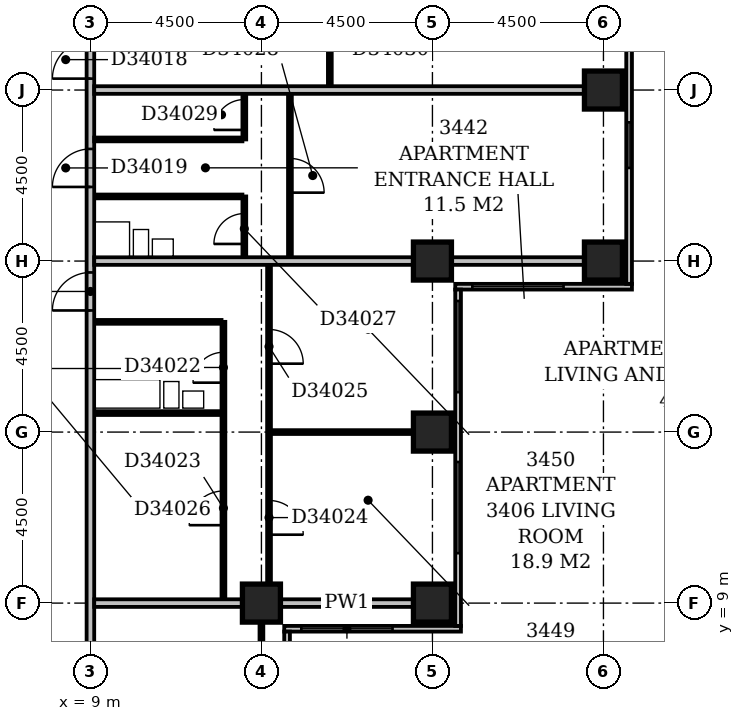
"""IFC4 building model, lengths in metres.
Left out: names, types, materials, properties, quantities, classifications, styles, units other than length and angle.
Written with IfcOpenShell. Run it as: python <this file> out.ifc"""

import sys

from ifc_helpers import new_model, si_unit, direction, frame, frame_2d, origin, origin_2d, place, context, subcontext, project, spatial, rectangle, extrude, element, fill, save


model = new_model("IFC4")
c1 = context("Model", 3, precision=1e-05, world=origin(), true_north=direction((0.0, 1.0)))
c2 = subcontext(c1, "Body", "Model", "MODEL_VIEW")
j1 = project(units=[si_unit("LENGTHUNIT", "METRE"), si_unit("PLANEANGLEUNIT", "RADIAN")], contexts=[c1])
p1 = place(None, origin())
s1 = spatial("IfcSite", under=j1, at=p1, CompositionType="ELEMENT")
p2 = place(p1, origin())
s2 = spatial("IfcBuilding", under=s1, at=p2, CompositionType="ELEMENT")
p3 = place(p2, frame((0.0, 0.0, 137.6)))
s3 = spatial("IfcBuildingStorey", under=s2, at=p3, CompositionType="ELEMENT", Elevation=137.6)
for number, where, z_axis, x_axis in (
    (1, (13.5, 9.0, -0.3), (0.0, 0.0, 1.0), (1.0, 0.0, 0.0)),
    (2, (18.0, 9.0, -0.3), (0.0, 0.0, 1.0), (1.0, 0.0, 0.0)),
    (3, (18.0, 13.5, -0.3), (0.0, 0.0, 1.0), (1.0, 0.0, 0.0)),
    (4, (18.0, 18.0, -0.3), (0.0, 0.0, 1.0), (1.0, 0.0, 0.0)),
    (5, (22.5, 18.0, -0.3), (0.0, 0.0, 1.0), (1.0, 0.0, 0.0)),
    (6, (22.5, 22.5, -0.3), (0.0, 0.0, 1.0), (1.0, 0.0, 0.0)),
):
    element("IfcColumn", number, at=place(p3, frame(where, z_axis=z_axis, x_axis=x_axis)), inside=s3, PredefinedType="COLUMN", context=c2, shape_type="SweptSolid", body=[
        extrude(rectangle(XDim=1.0, YDim=1.0, at=origin_2d()), origin(), (0.0, 0.0, 1.0), 3.6),
    ])
p4 = place(p3, frame((14.175, 3.9, 0.0), z_axis=(0.0, 0.0, 1.0), x_axis=(0.0, 1.0, 0.0)))
e7 = element("IfcWall", 7, at=p4, inside=s3, PredefinedType="STANDARD", context=c2, shape_type="SweptSolid", body=[
    extrude(rectangle(XDim=4.35, YDim=0.15, at=frame_2d((2.175, 0.0))), origin(), (0.0, 0.0, 1.0), 2.7),
])
p5 = place(p4, frame((1.65, 0.0, 0.6)))
e8 = element("IfcOpeningElement", 8, at=p5, cuts=e7, PredefinedType="OPENING", context=c2, shape_type="SweptSolid", body=[
    extrude(rectangle(XDim=2.4, YDim=1.8, at=frame_2d((1.2, 0.9))), frame((0.0, 0.087, 0.0), z_axis=(0.0, -1.0, 0.0), x_axis=(1.0, 0.0, 0.0)), (0.0, 0.0, 1.0), 0.174),
])
p6 = place(p3, frame((14.1, 8.325, 0.0), z_axis=(0.0, 0.0, 1.0), x_axis=(1.0, 0.0, 0.0)))
e9 = element("IfcWall", 9, at=p6, inside=s3, PredefinedType="STANDARD", context=c2, shape_type="SweptSolid", body=[
    extrude(rectangle(XDim=4.65, YDim=0.15, at=frame_2d((2.325, 0.0))), origin(), (0.0, 0.0, 1.0), 2.7),
])
p7 = place(p6, frame((0.45, 0.0, 0.6)))
e10 = element("IfcOpeningElement", 10, at=p7, cuts=e9, PredefinedType="OPENING", context=c2, shape_type="SweptSolid", body=[
    extrude(rectangle(XDim=2.4, YDim=1.8, at=frame_2d((1.2, 0.9))), frame((0.0, 0.087, 0.0), z_axis=(0.0, -1.0, 0.0), x_axis=(1.0, 0.0, 0.0)), (0.0, 0.0, 1.0), 0.174),
])
p8 = place(p3, frame((18.675, 8.4, 0.0), z_axis=(0.0, 0.0, 1.0), x_axis=(0.0, 1.0, 0.0)))
e11 = element("IfcWall", 11, at=p8, inside=s3, PredefinedType="STANDARD", context=c2, shape_type="SweptSolid", body=[
    extrude(rectangle(XDim=8.85, YDim=0.15, at=frame_2d((4.425, 0.0))), origin(), (0.0, 0.0, 1.0), 2.7),
])
p9 = place(p8, frame((1.914, 0.0, 0.6)))
e12 = element("IfcOpeningElement", 12, at=p9, cuts=e11, PredefinedType="OPENING", context=c2, shape_type="SweptSolid", body=[
    extrude(rectangle(XDim=2.4, YDim=1.8, at=frame_2d((1.2, 0.9))), frame((0.0, 0.087, 0.0), z_axis=(0.0, -1.0, 0.0), x_axis=(1.0, 0.0, 0.0)), (0.0, 0.0, 1.0), 0.174),
])
p10 = place(p8, frame((6.15, 0.0, 0.6)))
e13 = element("IfcOpeningElement", 13, at=p10, cuts=e11, PredefinedType="OPENING", context=c2, shape_type="SweptSolid", body=[
    extrude(rectangle(XDim=2.4, YDim=1.8, at=frame_2d((1.2, 0.9))), frame((0.0, 0.087, 0.0), z_axis=(0.0, -1.0, 0.0), x_axis=(1.0, 0.0, 0.0)), (0.0, 0.0, 1.0), 0.174),
])
p11 = place(p3, frame((18.6, 17.325, 0.0), z_axis=(0.0, 0.0, 1.0), x_axis=(1.0, 0.0, 0.0)))
e14 = element("IfcWall", 14, at=p11, inside=s3, PredefinedType="STANDARD", context=c2, shape_type="SweptSolid", body=[
    extrude(rectangle(XDim=4.65, YDim=0.15, at=frame_2d((2.325, 0.0))), origin(), (0.0, 0.0, 1.0), 2.7),
])
p12 = place(p11, frame((0.45, 0.0, 0.6)))
e15 = element("IfcOpeningElement", 15, at=p12, cuts=e14, PredefinedType="OPENING", context=c2, shape_type="SweptSolid", body=[
    extrude(rectangle(XDim=2.4, YDim=1.8, at=frame_2d((1.2, 0.9))), frame((0.0, 0.087, 0.0), z_axis=(0.0, -1.0, 0.0), x_axis=(1.0, 0.0, 0.0)), (0.0, 0.0, 1.0), 0.174),
])
p13 = place(p3, frame((23.175, 17.4, 0.0), z_axis=(0.0, 0.0, 1.0), x_axis=(0.0, 1.0, 0.0)))
e16 = element("IfcWall", 16, at=p13, inside=s3, PredefinedType="STANDARD", context=c2, shape_type="SweptSolid", body=[
    extrude(rectangle(XDim=17.85, YDim=0.15, at=frame_2d((8.925, 0.0))), origin(), (0.0, 0.0, 1.0), 2.7),
])
p14 = place(p13, frame((3.05, 0.0, 0.6)))
e17 = element("IfcOpeningElement", 17, at=p14, cuts=e16, PredefinedType="OPENING", context=c2, shape_type="SweptSolid", body=[
    extrude(rectangle(XDim=1.2, YDim=1.8, at=frame_2d((0.6, 0.9))), frame((0.0, 0.087, 0.0), z_axis=(0.0, -1.0, 0.0), x_axis=(1.0, 0.0, 0.0)), (0.0, 0.0, 1.0), 0.174),
])
p15 = place(p13, frame((6.15, 0.0, 0.6)))
e18 = element("IfcOpeningElement", 18, at=p15, cuts=e16, PredefinedType="OPENING", context=c2, shape_type="SweptSolid", body=[
    extrude(rectangle(XDim=2.4, YDim=1.8, at=frame_2d((1.2, 0.9))), frame((0.0, 0.087, 0.0), z_axis=(0.0, -1.0, 0.0), x_axis=(1.0, 0.0, 0.0)), (0.0, 0.0, 1.0), 0.174),
])
p16 = place(p13, frame((10.65, 0.0, 0.6)))
e19 = element("IfcOpeningElement", 19, at=p16, cuts=e16, PredefinedType="OPENING", context=c2, shape_type="SweptSolid", body=[
    extrude(rectangle(XDim=2.4, YDim=1.8, at=frame_2d((1.2, 0.9))), frame((0.0, 0.087, 0.0), z_axis=(0.0, -1.0, 0.0), x_axis=(1.0, 0.0, 0.0)), (0.0, 0.0, 1.0), 0.174),
])
p17 = place(p13, frame((15.15, 0.0, 0.6)))
e20 = element("IfcOpeningElement", 20, at=p17, cuts=e16, PredefinedType="OPENING", context=c2, shape_type="SweptSolid", body=[
    extrude(rectangle(XDim=2.4, YDim=1.8, at=frame_2d((1.2, 0.9))), frame((0.0, 0.087, 0.0), z_axis=(0.0, -1.0, 0.0), x_axis=(1.0, 0.0, 0.0)), (0.0, 0.0, 1.0), 0.174),
])
p18 = place(p3, frame((9.0, 5.0, 0.0), z_axis=(0.0, 0.0, 1.0), x_axis=(0.0, 1.0, 0.0)))
e21 = element("IfcWall", 21, at=p18, inside=s3, PredefinedType="PARTITIONING", context=c2, shape_type="SweptSolid", body=[
    extrude(rectangle(XDim=27.75, YDim=0.2, at=frame_2d((13.875, 0.0))), origin(), (0.0, 0.0, 1.0), 3.3),
])
p19 = place(p18, frame((17.8, 0.0, 0.0)))
e22 = element("IfcOpeningElement", 22, at=p19, cuts=e21, PredefinedType="OPENING", context=c2, shape_type="SweptSolid", body=[
    extrude(rectangle(XDim=1.0, YDim=2.1, at=frame_2d((0.5, 1.05))), frame((0.0, 0.112, 0.0), z_axis=(0.0, -1.0, 0.0), x_axis=(1.0, 0.0, 0.0)), (0.0, 0.0, 1.0), 0.224),
])
p20 = place(p18, frame((14.95, 0.0, 0.0)))
e23 = element("IfcOpeningElement", 23, at=p20, cuts=e21, PredefinedType="OPENING", context=c2, shape_type="SweptSolid", body=[
    extrude(rectangle(XDim=1.0, YDim=2.1, at=frame_2d((0.5, 1.05))), frame((0.0, 0.112, 0.0), z_axis=(0.0, -1.0, 0.0), x_axis=(1.0, 0.0, 0.0)), (0.0, 0.0, 1.0), 0.224),
])
p21 = place(p18, frame((11.7, 0.0, 0.0)))
e24 = element("IfcOpeningElement", 24, at=p21, cuts=e21, PredefinedType="OPENING", context=c2, shape_type="SweptSolid", body=[
    extrude(rectangle(XDim=1.0, YDim=2.1, at=frame_2d((0.5, 1.05))), frame((0.0, 0.112, 0.0), z_axis=(0.0, -1.0, 0.0), x_axis=(1.0, 0.0, 0.0)), (0.0, 0.0, 1.0), 0.224),
])
p22 = place(p18, frame((1.5, 0.0, 0.0)))
e25 = element("IfcOpeningElement", 25, at=p22, cuts=e21, PredefinedType="OPENING", context=c2, shape_type="SweptSolid", body=[
    extrude(rectangle(XDim=0.9, YDim=2.1, at=frame_2d((0.45, 1.05))), frame((0.0, 0.112, 0.0), z_axis=(0.0, -1.0, 0.0), x_axis=(1.0, 0.0, 0.0)), (0.0, 0.0, 1.0), 0.224),
])
p23 = place(p3, frame((13.5, 5.0, 0.0), z_axis=(0.0, 0.0, 1.0), x_axis=(0.0, 1.0, 0.0)))
e26 = element("IfcWall", 26, at=p23, inside=s3, PredefinedType="PARTITIONING", context=c2, shape_type="SweptSolid", body=[
    extrude(rectangle(XDim=3.5, YDim=0.1, at=frame_2d((1.75, 0.0))), origin(), (0.0, 0.0, 1.0), 2.7),
])
p24 = place(p3, frame((9.1, 9.0, 0.0), z_axis=(0.0, 0.0, 1.0), x_axis=(1.0, 0.0, 0.0)))
e27 = element("IfcWall", 27, at=p24, inside=s3, PredefinedType="PARTITIONING", context=c2, shape_type="SweptSolid", body=[
    extrude(rectangle(XDim=3.9, YDim=0.2, at=frame_2d((1.95, 0.0))), origin(), (0.0, 0.0, 1.0), 3.3),
])
p25 = place(p3, frame((14.0, 9.0, 0.0), z_axis=(0.0, 0.0, 1.0), x_axis=(1.0, 0.0, 0.0)))
e28 = element("IfcWall", 28, at=p25, inside=s3, PredefinedType="PARTITIONING", context=c2, shape_type="SweptSolid", body=[
    extrude(rectangle(XDim=3.5, YDim=0.2, at=frame_2d((1.75, 0.0))), origin(), (0.0, 0.0, 1.0), 2.7),
])
p26 = place(p3, frame((12.5, 9.1, 0.0), z_axis=(0.0, 0.0, 1.0), x_axis=(0.0, 1.0, 0.0)))
e29 = element("IfcWall", 29, at=p26, inside=s3, PredefinedType="PARTITIONING", context=c2, shape_type="SweptSolid", body=[
    extrude(rectangle(XDim=7.3, YDim=0.1, at=frame_2d((3.65, 0.0))), origin(), (0.0, 0.0, 1.0), 3.3),
])
p27 = place(p26, frame((5.7, 0.0, 0.0)))
e30 = element("IfcOpeningElement", 30, at=p27, cuts=e29, PredefinedType="OPENING", context=c2, shape_type="SweptSolid", body=[
    extrude(rectangle(XDim=0.8, YDim=2.1, at=frame_2d((0.4, 1.05))), frame((0.0, 0.062, 0.0), z_axis=(0.0, -1.0, 0.0), x_axis=(1.0, 0.0, 0.0)), (0.0, 0.0, 1.0), 0.124),
])
p28 = place(p26, frame((1.95, 0.0, 0.0)))
e31 = element("IfcOpeningElement", 31, at=p28, cuts=e29, PredefinedType="OPENING", context=c2, shape_type="SweptSolid", body=[
    extrude(rectangle(XDim=0.9, YDim=2.1, at=frame_2d((0.45, 1.05))), frame((0.0, 0.062, 0.0), z_axis=(0.0, -1.0, 0.0), x_axis=(1.0, 0.0, 0.0)), (0.0, 0.0, 1.0), 0.124),
])
p29 = place(p3, frame((13.7, 9.5, 0.0), z_axis=(0.0, 0.0, 1.0), x_axis=(0.0, 1.0, 0.0)))
e32 = element("IfcWall", 32, at=p29, inside=s3, PredefinedType="PARTITIONING", context=c2, shape_type="SweptSolid", body=[
    extrude(rectangle(XDim=8.4, YDim=0.1, at=frame_2d((4.2, 0.0))), origin(), (0.0, 0.0, 1.0), 3.3),
])
p30 = place(p29, frame((1.3, 0.0, 0.0)))
e33 = element("IfcOpeningElement", 33, at=p30, cuts=e32, PredefinedType="OPENING", context=c2, shape_type="SweptSolid", body=[
    extrude(rectangle(XDim=0.9, YDim=2.1, at=frame_2d((0.45, 1.05))), frame((0.0, 0.062, 0.0), z_axis=(0.0, -1.0, 0.0), x_axis=(1.0, 0.0, 0.0)), (0.0, 0.0, 1.0), 0.124),
])
p31 = place(p29, frame((5.8, 0.0, 0.0)))
e34 = element("IfcOpeningElement", 34, at=p31, cuts=e32, PredefinedType="OPENING", context=c2, shape_type="SweptSolid", body=[
    extrude(rectangle(XDim=0.9, YDim=2.1, at=frame_2d((0.45, 1.05))), frame((0.0, 0.062, 0.0), z_axis=(0.0, -1.0, 0.0), x_axis=(1.0, 0.0, 0.0)), (0.0, 0.0, 1.0), 0.124),
])
p32 = place(p3, frame((13.75, 13.5, 0.0), z_axis=(0.0, 0.0, 1.0), x_axis=(1.0, 0.0, 0.0)))
e35 = element("IfcWall", 35, at=p32, inside=s3, PredefinedType="PARTITIONING", context=c2, shape_type="SweptSolid", body=[
    extrude(rectangle(XDim=3.75, YDim=0.1, at=frame_2d((1.875, 0.0))), origin(), (0.0, 0.0, 1.0), 3.3),
])
for number, where, z_axis, x_axis in (
    (36, (9.1, 14.0, 0.0), (0.0, 0.0, 1.0), (1.0, 0.0, 0.0)),
    (37, (9.1, 16.4, 0.0), (0.0, 0.0, 1.0), (1.0, 0.0, 0.0)),
):
    element("IfcWall", number, at=place(p3, frame(where, z_axis=z_axis, x_axis=x_axis)), inside=s3, PredefinedType="PLUMBINGWALL", context=c2, shape_type="SweptSolid", body=[
        extrude(rectangle(XDim=3.35, YDim=0.1, at=frame_2d((1.675, 0.0))), origin(), (0.0, 0.0, 1.0), 3.3),
    ])
p33 = place(p3, frame((9.1, 18.0, 0.0), z_axis=(0.0, 0.0, 1.0), x_axis=(1.0, 0.0, 0.0)))
e38 = element("IfcWall", 38, at=p33, inside=s3, PredefinedType="PARTITIONING", context=c2, shape_type="SweptSolid", body=[
    extrude(rectangle(XDim=8.4, YDim=0.2, at=frame_2d((4.2, 0.0))), origin(), (0.0, 0.0, 1.0), 2.6),
])
p34 = place(p3, frame((18.5, 18.0, 0.0), z_axis=(0.0, 0.0, 1.0), x_axis=(1.0, 0.0, 0.0)))
e39 = element("IfcWall", 39, at=p34, inside=s3, PredefinedType="PARTITIONING", context=c2, shape_type="SweptSolid", body=[
    extrude(rectangle(XDim=3.5, YDim=0.2, at=frame_2d((1.75, 0.0))), origin(), (0.0, 0.0, 1.0), 2.7),
])
p35 = place(p3, frame((13.05, 18.1, 0.0), z_axis=(0.0, 0.0, 1.0), x_axis=(0.0, 1.0, 0.0)))
e40 = element("IfcWall", 40, at=p35, inside=s3, PredefinedType="PARTITIONING", context=c2, shape_type="SweptSolid", body=[
    extrude(rectangle(XDim=1.6, YDim=0.1, at=frame_2d((0.8, 0.0))), origin(), (0.0, 0.0, 1.0), 3.3),
])
p36 = place(p35, frame((0.35, 0.0, 0.0)))
e41 = element("IfcOpeningElement", 41, at=p36, cuts=e40, PredefinedType="OPENING", context=c2, shape_type="SweptSolid", body=[
    extrude(rectangle(XDim=0.8, YDim=2.1, at=frame_2d((0.4, 1.05))), frame((0.0, 0.062, 0.0), z_axis=(0.0, -1.0, 0.0), x_axis=(1.0, 0.0, 0.0)), (0.0, 0.0, 1.0), 0.124),
])
p37 = place(p3, frame((14.25, 18.1, 0.0), z_axis=(0.0, 0.0, 1.0), x_axis=(0.0, 1.0, 0.0)))
e42 = element("IfcWall", 42, at=p37, inside=s3, PredefinedType="PARTITIONING", context=c2, shape_type="SweptSolid", body=[
    extrude(rectangle(XDim=4.3, YDim=0.1, at=frame_2d((2.15, 0.0))), origin(), (0.0, 0.0, 1.0), 3.3),
])
p38 = place(p37, frame((1.7, 0.0, 0.0)))
e43 = element("IfcOpeningElement", 43, at=p38, cuts=e42, PredefinedType="OPENING", context=c2, shape_type="SweptSolid", body=[
    extrude(rectangle(XDim=0.9, YDim=2.1, at=frame_2d((0.45, 1.05))), frame((0.0, 0.062, 0.0), z_axis=(0.0, -1.0, 0.0), x_axis=(1.0, 0.0, 0.0)), (0.0, 0.0, 1.0), 0.124),
])
p39 = place(p3, frame((9.1, 19.7, 0.0), z_axis=(0.0, 0.0, 1.0), x_axis=(1.0, 0.0, 0.0)))
e44 = element("IfcWall", 44, at=p39, inside=s3, PredefinedType="PLUMBINGWALL", context=c2, shape_type="SweptSolid", body=[
    extrude(rectangle(XDim=3.9, YDim=0.1, at=frame_2d((1.95, 0.0))), origin(), (0.0, 0.0, 1.0), 3.3),
])
p40 = place(p3, frame((9.1, 21.2, 0.0), z_axis=(0.0, 0.0, 1.0), x_axis=(1.0, 0.0, 0.0)))
e45 = element("IfcWall", 45, at=p40, inside=s3, PredefinedType="PARTITIONING", context=c2, shape_type="SweptSolid", body=[
    extrude(rectangle(XDim=3.9, YDim=0.1, at=frame_2d((1.95, 0.0))), origin(), (0.0, 0.0, 1.0), 3.3),
])
p41 = place(p3, frame((13.05, 21.2, 0.0), z_axis=(0.0, 0.0, 1.0), x_axis=(0.0, 1.0, 0.0)))
e46 = element("IfcWall", 46, at=p41, inside=s3, PredefinedType="PARTITIONING", context=c2, shape_type="SweptSolid", body=[
    extrude(rectangle(XDim=1.2, YDim=0.1, at=frame_2d((0.6, 0.0))), origin(), (0.0, 0.0, 1.0), 3.3),
])
p42 = place(p41, frame((0.25, 0.0, 0.0)))
e47 = element("IfcOpeningElement", 47, at=p42, cuts=e46, PredefinedType="OPENING", context=c2, shape_type="SweptSolid", body=[
    extrude(rectangle(XDim=0.8, YDim=2.1, at=frame_2d((0.4, 1.05))), frame((0.0, 0.062, 0.0), z_axis=(0.0, -1.0, 0.0), x_axis=(1.0, 0.0, 0.0)), (0.0, 0.0, 1.0), 0.124),
])
p43 = place(p3, frame((9.1, 22.5, 0.0), z_axis=(0.0, 0.0, 1.0), x_axis=(1.0, 0.0, 0.0)))
e48 = element("IfcWall", 48, at=p43, inside=s3, PredefinedType="PARTITIONING", context=c2, shape_type="SweptSolid", body=[
    extrude(rectangle(XDim=12.9, YDim=0.2, at=frame_2d((6.45, 0.0))), origin(), (0.0, 0.0, 1.0), 3.3),
])
p44 = place(p3, frame((15.3, 22.6, 0.0), z_axis=(0.0, 0.0, 1.0), x_axis=(0.0, 1.0, 0.0)))
e49 = element("IfcWall", 49, at=p44, inside=s3, PredefinedType="PARTITIONING", context=c2, shape_type="SweptSolid", body=[
    extrude(rectangle(XDim=8.8, YDim=0.1, at=frame_2d((4.4, 0.0))), origin(), (0.0, 0.0, 1.0), 3.3),
])
p45 = place(p44, frame((1.7, 0.0, 0.0)))
e50 = element("IfcOpeningElement", 50, at=p45, cuts=e49, PredefinedType="OPENING", context=c2, shape_type="SweptSolid", body=[
    extrude(rectangle(XDim=0.9, YDim=2.1, at=frame_2d((0.45, 1.05))), frame((0.0, 0.062, 0.0), z_axis=(0.0, -1.0, 0.0), x_axis=(1.0, 0.0, 0.0)), (0.0, 0.0, 1.0), 0.124),
])
p46 = place(p44, frame((6.2, 0.0, 0.0)))
e51 = element("IfcOpeningElement", 51, at=p46, cuts=e49, PredefinedType="OPENING", context=c2, shape_type="SweptSolid", body=[
    extrude(rectangle(XDim=0.9, YDim=2.1, at=frame_2d((0.45, 1.05))), frame((0.0, 0.062, 0.0), z_axis=(0.0, -1.0, 0.0), x_axis=(1.0, 0.0, 0.0)), (0.0, 0.0, 1.0), 0.124),
])
p47 = place(p7, origin())
e52 = element("IfcWindow", 52, at=p47, inside=s3, PartitioningType="SINGLE_PANEL", PredefinedType="WINDOW", context=c2, shape_type="SweptSolid", body=[
    extrude(rectangle(XDim=2.4, YDim=1.8, at=frame_2d((1.2, 0.9))), frame((0.0, 0.03, 0.0), z_axis=(0.0, -1.0, 0.0), x_axis=(1.0, 0.0, 0.0)), (0.0, 0.0, 1.0), 0.06),
])
fill(e10, e52)
p48 = place(p9, origin())
e53 = element("IfcWindow", 53, at=p48, inside=s3, PartitioningType="SINGLE_PANEL", PredefinedType="WINDOW", context=c2, shape_type="SweptSolid", body=[
    extrude(rectangle(XDim=2.4, YDim=1.8, at=frame_2d((1.2, 0.9))), frame((0.0, 0.03, 0.0), z_axis=(0.0, -1.0, 0.0), x_axis=(1.0, 0.0, 0.0)), (0.0, 0.0, 1.0), 0.06),
])
fill(e12, e53)
p49 = place(p10, origin())
e54 = element("IfcWindow", 54, at=p49, inside=s3, PartitioningType="SINGLE_PANEL", PredefinedType="WINDOW", context=c2, shape_type="SweptSolid", body=[
    extrude(rectangle(XDim=2.4, YDim=1.8, at=frame_2d((1.2, 0.9))), frame((0.0, 0.03, 0.0), z_axis=(0.0, -1.0, 0.0), x_axis=(1.0, 0.0, 0.0)), (0.0, 0.0, 1.0), 0.06),
])
fill(e13, e54)
p50 = place(p12, origin())
e55 = element("IfcWindow", 55, at=p50, inside=s3, PartitioningType="SINGLE_PANEL", PredefinedType="WINDOW", context=c2, shape_type="SweptSolid", body=[
    extrude(rectangle(XDim=2.4, YDim=1.8, at=frame_2d((1.2, 0.9))), frame((0.0, 0.03, 0.0), z_axis=(0.0, -1.0, 0.0), x_axis=(1.0, 0.0, 0.0)), (0.0, 0.0, 1.0), 0.06),
])
fill(e15, e55)
p51 = place(p14, origin())
e56 = element("IfcWindow", 56, at=p51, inside=s3, PartitioningType="SINGLE_PANEL", PredefinedType="WINDOW", context=c2, shape_type="SweptSolid", body=[
    extrude(rectangle(XDim=1.2, YDim=1.8, at=frame_2d((0.6, 0.9))), frame((0.0, 0.03, 0.0), z_axis=(0.0, -1.0, 0.0), x_axis=(1.0, 0.0, 0.0)), (0.0, 0.0, 1.0), 0.06),
])
fill(e17, e56)
p52 = place(p19, origin())
e57 = element("IfcDoor", 57, at=p52, inside=s3, OperationType="SINGLE_SWING_LEFT", PredefinedType="DOOR", context=c2, shape_type="SweptSolid", body=[
    extrude(rectangle(XDim=1.0, YDim=2.1, at=frame_2d((0.5, 1.05))), frame((0.0, 0.025, 0.0), z_axis=(0.0, -1.0, 0.0), x_axis=(1.0, 0.0, 0.0)), (0.0, 0.0, 1.0), 0.05),
])
fill(e22, e57)
p53 = place(p20, origin())
e58 = element("IfcDoor", 58, at=p53, inside=s3, OperationType="SINGLE_SWING_LEFT", PredefinedType="DOOR", context=c2, shape_type="SweptSolid", body=[
    extrude(rectangle(XDim=1.0, YDim=2.1, at=frame_2d((0.5, 1.05))), frame((0.0, 0.025, 0.0), z_axis=(0.0, -1.0, 0.0), x_axis=(1.0, 0.0, 0.0)), (0.0, 0.0, 1.0), 0.05),
])
fill(e23, e58)
p54 = place(p21, origin())
e59 = element("IfcDoor", 59, at=p54, inside=s3, OperationType="SINGLE_SWING_LEFT", PredefinedType="DOOR", context=c2, shape_type="SweptSolid", body=[
    extrude(rectangle(XDim=1.0, YDim=2.1, at=frame_2d((0.5, 1.05))), frame((0.0, 0.025, 0.0), z_axis=(0.0, -1.0, 0.0), x_axis=(1.0, 0.0, 0.0)), (0.0, 0.0, 1.0), 0.05),
])
fill(e24, e59)
p55 = place(p27, origin())
e60 = element("IfcDoor", 60, at=p55, inside=s3, OperationType="SINGLE_SWING_LEFT", PredefinedType="DOOR", context=c2, shape_type="SweptSolid", body=[
    extrude(rectangle(XDim=0.8, YDim=2.1, at=frame_2d((0.4, 1.05))), frame((0.0, 0.025, 0.0), z_axis=(0.0, -1.0, 0.0), x_axis=(1.0, 0.0, 0.0)), (0.0, 0.0, 1.0), 0.05),
])
fill(e30, e60)
p56 = place(p28, origin())
e61 = element("IfcDoor", 61, at=p56, inside=s3, OperationType="SINGLE_SWING_LEFT", PredefinedType="DOOR", context=c2, shape_type="SweptSolid", body=[
    extrude(rectangle(XDim=0.9, YDim=2.1, at=frame_2d((0.45, 1.05))), frame((0.0, 0.025, 0.0), z_axis=(0.0, -1.0, 0.0), x_axis=(1.0, 0.0, 0.0)), (0.0, 0.0, 1.0), 0.05),
])
fill(e31, e61)
p57 = place(p30, frame((0.9, 0.0, 0.0), z_axis=(0.0, 0.0, 1.0), x_axis=(-1.0, 0.0, 0.0)))
e62 = element("IfcDoor", 62, at=p57, inside=s3, OperationType="SINGLE_SWING_RIGHT", PredefinedType="DOOR", context=c2, shape_type="SweptSolid", body=[
    extrude(rectangle(XDim=0.9, YDim=2.1, at=frame_2d((0.45, 1.05))), frame((0.0, 0.025, 0.0), z_axis=(0.0, -1.0, 0.0), x_axis=(1.0, 0.0, 0.0)), (0.0, 0.0, 1.0), 0.05),
])
fill(e33, e62)
p58 = place(p31, frame((0.9, 0.0, 0.0), z_axis=(0.0, 0.0, 1.0), x_axis=(-1.0, 0.0, 0.0)))
e63 = element("IfcDoor", 63, at=p58, inside=s3, OperationType="SINGLE_SWING_RIGHT", PredefinedType="DOOR", context=c2, shape_type="SweptSolid", body=[
    extrude(rectangle(XDim=0.9, YDim=2.1, at=frame_2d((0.45, 1.05))), frame((0.0, 0.025, 0.0), z_axis=(0.0, -1.0, 0.0), x_axis=(1.0, 0.0, 0.0)), (0.0, 0.0, 1.0), 0.05),
])
fill(e34, e63)
p59 = place(p36, origin())
e64 = element("IfcDoor", 64, at=p59, inside=s3, OperationType="SINGLE_SWING_LEFT", PredefinedType="DOOR", context=c2, shape_type="SweptSolid", body=[
    extrude(rectangle(XDim=0.8, YDim=2.1, at=frame_2d((0.4, 1.05))), frame((0.0, 0.025, 0.0), z_axis=(0.0, -1.0, 0.0), x_axis=(1.0, 0.0, 0.0)), (0.0, 0.0, 1.0), 0.05),
])
fill(e41, e64)
p60 = place(p38, frame((0.9, 0.0, 0.0), z_axis=(0.0, 0.0, 1.0), x_axis=(-1.0, 0.0, 0.0)))
e65 = element("IfcDoor", 65, at=p60, inside=s3, OperationType="SINGLE_SWING_RIGHT", PredefinedType="DOOR", context=c2, shape_type="SweptSolid", body=[
    extrude(rectangle(XDim=0.9, YDim=2.1, at=frame_2d((0.45, 1.05))), frame((0.0, 0.025, 0.0), z_axis=(0.0, -1.0, 0.0), x_axis=(1.0, 0.0, 0.0)), (0.0, 0.0, 1.0), 0.05),
])
fill(e43, e65)
p61 = place(p42, origin())
e66 = element("IfcDoor", 66, at=p61, inside=s3, OperationType="SINGLE_SWING_LEFT", PredefinedType="DOOR", context=c2, shape_type="SweptSolid", body=[
    extrude(rectangle(XDim=0.8, YDim=2.1, at=frame_2d((0.4, 1.05))), frame((0.0, 0.025, 0.0), z_axis=(0.0, -1.0, 0.0), x_axis=(1.0, 0.0, 0.0)), (0.0, 0.0, 1.0), 0.05),
])
fill(e47, e66)
save(model, sys.argv[1])
